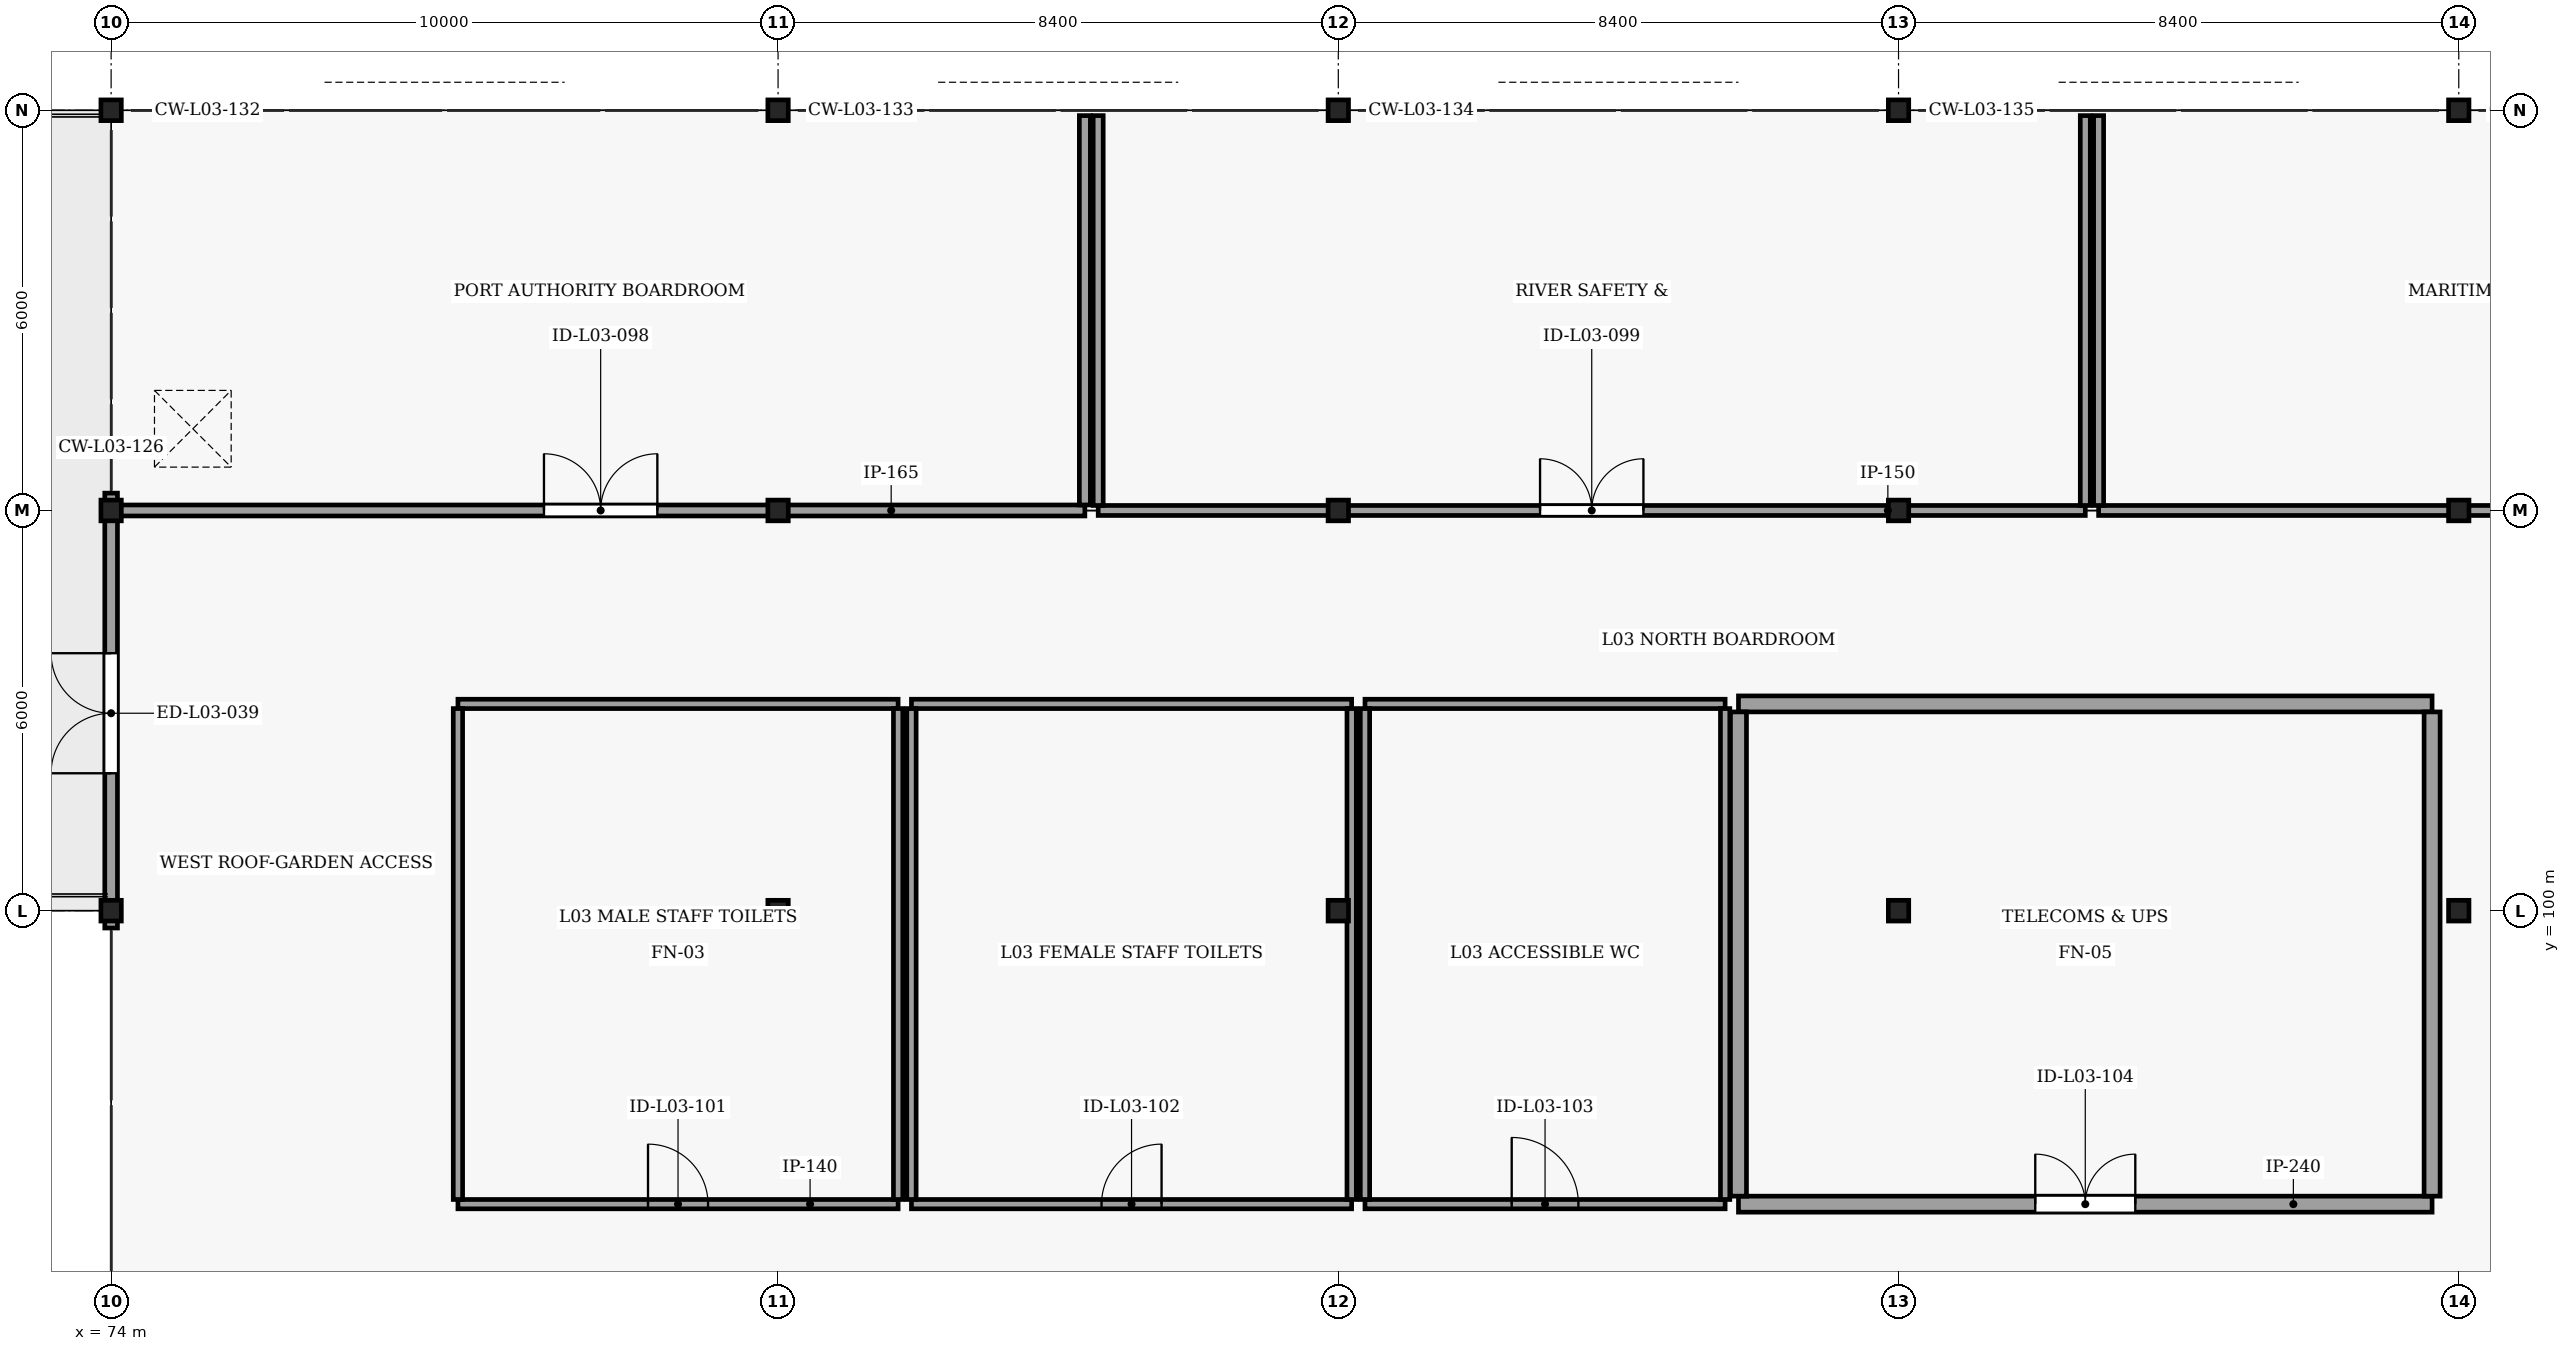
"""IFC4 building model, lengths in metres.
Left out: names, types, materials, properties, quantities, classifications, styles, units other than length and angle.
Written with IfcOpenShell. Run it as: python <this file> out.ifc"""

import sys

from ifc_helpers import new_model, si_unit, direction, frame, frame_2d, origin, origin_2d, place, context, subcontext, project, spatial, rectangle, i_section, extrude, element, fill, save


model = new_model("IFC4")
c1 = context("Model", 3, precision=1e-05, world=origin(), true_north=direction((0.0, 1.0)))
c2 = subcontext(c1, "Body", "Model", "MODEL_VIEW")
j1 = project(units=[si_unit("LENGTHUNIT", "METRE"), si_unit("PLANEANGLEUNIT", "RADIAN")], contexts=[c1])
p1 = place(None, origin())
s1 = spatial("IfcSite", under=j1, at=p1, CompositionType="ELEMENT")
p2 = place(p1, origin())
s2 = spatial("IfcBuilding", under=s1, at=p2, CompositionType="ELEMENT")
p3 = place(p2, frame((0.0, 0.0, 10.2)))
s3 = spatial("IfcBuildingStorey", under=s2, at=p3, CompositionType="ELEMENT", Elevation=10.2)
for number, where, z_axis, x_axis in (
    (1, (74.0, 100.0, 0.0), (0.0, 0.0, 1.0), (1.0, 0.0, 0.0)),
    (2, (84.0, 100.0, 0.0), (0.0, 0.0, 1.0), (1.0, 0.0, 0.0)),
    (3, (92.4, 100.0, 0.0), (0.0, 0.0, 1.0), (1.0, 0.0, 0.0)),
    (4, (100.8, 100.0, 0.0), (0.0, 0.0, 1.0), (1.0, 0.0, 0.0)),
    (5, (109.2, 100.0, 0.0), (0.0, 0.0, 1.0), (1.0, 0.0, 0.0)),
    (6, (74.0, 106.0, 0.0), (0.0, 0.0, 1.0), (1.0, 0.0, 0.0)),
    (7, (84.0, 106.0, 0.0), (0.0, 0.0, 1.0), (1.0, 0.0, 0.0)),
    (8, (92.4, 106.0, 0.0), (0.0, 0.0, 1.0), (1.0, 0.0, 0.0)),
    (9, (100.8, 106.0, 0.0), (0.0, 0.0, 1.0), (1.0, 0.0, 0.0)),
    (10, (109.2, 106.0, 0.0), (0.0, 0.0, 1.0), (1.0, 0.0, 0.0)),
):
    element("IfcColumn", number, at=place(p3, frame(where, z_axis=z_axis, x_axis=x_axis)), inside=s3, PredefinedType="COLUMN", context=c2, shape_type="SweptSolid", body=[
        extrude(i_section(OverallWidth=0.306, OverallDepth=0.311, WebThickness=0.011, FlangeThickness=0.017, FilletRadius=0.015, at=origin_2d()), origin(), (0.0, 0.0, 1.0), 3.92),
    ])
for number, where, z_axis, x_axis in (
    (11, (74.0, 112.0, 0.0), (0.0, 0.0, 1.0), (1.0, 0.0, 0.0)),
    (12, (84.0, 112.0, 0.0), (0.0, 0.0, 1.0), (1.0, 0.0, 0.0)),
    (13, (92.4, 112.0, 0.0), (0.0, 0.0, 1.0), (1.0, 0.0, 0.0)),
    (14, (100.8, 112.0, 0.0), (0.0, 0.0, 1.0), (1.0, 0.0, 0.0)),
    (15, (109.2, 112.0, 0.0), (0.0, 0.0, 1.0), (1.0, 0.0, 0.0)),
):
    element("IfcColumn", number, at=place(p3, frame(where, z_axis=z_axis, x_axis=x_axis)), inside=s3, PredefinedType="COLUMN", context=c2, shape_type="SweptSolid", body=[
        extrude(i_section(OverallWidth=0.306, OverallDepth=0.311, WebThickness=0.011, FlangeThickness=0.017, FilletRadius=0.015, at=origin_2d()), origin(), (0.0, 0.0, 1.0), 3.85),
    ])
p4 = place(p3, frame((74.0, 99.74, 0.0), z_axis=(0.0, 0.0, 1.0), x_axis=(0.0, 1.0, 0.0)))
e16 = element("IfcWall", 16, at=p4, inside=s3, PredefinedType="SOLIDWALL", context=c2, shape_type="SweptSolid", body=[
    extrude(rectangle(XDim=6.52, YDim=0.19, at=frame_2d((3.26, 0.0))), origin(), (0.0, 0.0, 1.0), 3.508),
])
p5 = place(p4, frame((2.32, 0.0, 0.0)))
e17 = element("IfcOpeningElement", 17, at=p5, cuts=e16, PredefinedType="OPENING", context=c2, shape_type="SweptSolid", body=[
    extrude(rectangle(XDim=1.8, YDim=2.25, at=frame_2d((0.9, 1.125))), frame((0.0, 0.105, 0.0), z_axis=(0.0, -1.0, 0.0), x_axis=(1.0, 0.0, 0.0)), (0.0, 0.0, 1.0), 0.21),
])
p6 = place(p3, frame((74.08, 106.0, 0.0), z_axis=(0.0, 0.0, 1.0), x_axis=(1.0, 0.0, 0.0)))
e18 = element("IfcWall", 18, at=p6, inside=s3, PredefinedType="PARTITIONING", context=c2, shape_type="SweptSolid", body=[
    extrude(rectangle(XDim=14.52, YDim=0.165, at=frame_2d((7.26, 0.0))), origin(), (0.0, 0.0, 1.0), 3.433),
])
p7 = place(p6, frame((6.41, 0.0, 0.0)))
e19 = element("IfcOpeningElement", 19, at=p7, cuts=e18, PredefinedType="OPENING", context=c2, shape_type="SweptSolid", body=[
    extrude(rectangle(XDim=1.7, YDim=2.25, at=frame_2d((0.85, 1.125))), frame((0.0, 0.093, 0.0), z_axis=(0.0, -1.0, 0.0), x_axis=(1.0, 0.0, 0.0)), (0.0, 0.0, 1.0), 0.185),
])
p8 = place(p3, frame((88.6, 106.083, 0.0), z_axis=(0.0, 0.0, 1.0), x_axis=(0.0, 1.0, 0.0)))
e20 = element("IfcWall", 20, at=p8, inside=s3, PredefinedType="PARTITIONING", context=c2, shape_type="SweptSolid", body=[
    extrude(rectangle(XDim=5.837, YDim=0.165, at=frame_2d((2.919, 0.0))), origin(), (0.0, 0.0, 1.0), 3.588),
])
p9 = place(p3, frame((88.8, 106.0, 0.0), z_axis=(0.0, 0.0, 1.0), x_axis=(1.0, 0.0, 0.0)))
e21 = element("IfcWall", 21, at=p9, inside=s3, PredefinedType="PARTITIONING", context=c2, shape_type="SweptSolid", body=[
    extrude(rectangle(XDim=14.8, YDim=0.15, at=frame_2d((7.4, 0.0))), origin(), (0.0, 0.0, 1.0), 3.433),
])
p10 = place(p9, frame((6.625, 0.0, 0.0)))
e22 = element("IfcOpeningElement", 22, at=p10, cuts=e21, PredefinedType="OPENING", context=c2, shape_type="SweptSolid", body=[
    extrude(rectangle(XDim=1.55, YDim=2.2, at=frame_2d((0.775, 1.1))), frame((0.0, 0.085, 0.0), z_axis=(0.0, -1.0, 0.0), x_axis=(1.0, 0.0, 0.0)), (0.0, 0.0, 1.0), 0.17),
])
for number, where, z_axis, x_axis in (
    (23, (88.8, 106.075, 0.0), (0.0, 0.0, 1.0), (0.0, 1.0, 0.0)),
    (24, (103.6, 106.075, 0.0), (0.0, 0.0, 1.0), (0.0, 1.0, 0.0)),
):
    element("IfcWall", number, at=place(p3, frame(where, z_axis=z_axis, x_axis=x_axis)), inside=s3, PredefinedType="PARTITIONING", context=c2, shape_type="SweptSolid", body=[
        extrude(rectangle(XDim=5.845, YDim=0.15, at=frame_2d((2.922, 0.0))), origin(), (0.0, 0.0, 1.0), 3.588),
    ])
p11 = place(p3, frame((103.8, 106.0, 0.0), z_axis=(0.0, 0.0, 1.0), x_axis=(1.0, 0.0, 0.0)))
e25 = element("IfcWall", 25, at=p11, inside=s3, PredefinedType="PARTITIONING", context=c2, shape_type="SweptSolid", body=[
    extrude(rectangle(XDim=13.72, YDim=0.15, at=frame_2d((6.86, 0.0))), origin(), (0.0, 0.0, 1.0), 3.433),
])
p12 = place(p11, frame((5.96, 0.0, 0.0)))
e26 = element("IfcOpeningElement", 26, at=p12, cuts=e25, PredefinedType="OPENING", context=c2, shape_type="SweptSolid", body=[
    extrude(rectangle(XDim=1.8, YDim=2.3, at=frame_2d((0.9, 1.15))), frame((0.0, 0.085, 0.0), z_axis=(0.0, -1.0, 0.0), x_axis=(1.0, 0.0, 0.0)), (0.0, 0.0, 1.0), 0.17),
])
p13 = place(p3, frame((103.8, 106.075, 0.0), z_axis=(0.0, 0.0, 1.0), x_axis=(0.0, 1.0, 0.0)))
e27 = element("IfcWall", 27, at=p13, inside=s3, PredefinedType="PARTITIONING", context=c2, shape_type="SweptSolid", body=[
    extrude(rectangle(XDim=5.845, YDim=0.15, at=frame_2d((2.922, 0.0))), origin(), (0.0, 0.0, 1.0), 3.588),
])
p14 = place(p3, frame((79.2, 95.6, 0.0), z_axis=(0.0, 0.0, 1.0), x_axis=(1.0, 0.0, 0.0)))
e28 = element("IfcWall", 28, at=p14, inside=s3, PredefinedType="PARTITIONING", context=c2, shape_type="SweptSolid", body=[
    extrude(rectangle(XDim=6.6, YDim=0.14, at=frame_2d((3.3, 0.0))), origin(), (0.0, 0.0, 1.0), 3.51),
])
p15 = place(p14, frame((2.85, 0.0, 0.0)))
e29 = element("IfcOpeningElement", 29, at=p15, cuts=e28, PredefinedType="OPENING", context=c2, shape_type="SweptSolid", body=[
    extrude(rectangle(XDim=0.9, YDim=2.1, at=frame_2d((0.45, 1.05))), frame((0.0, 0.08, 0.0), z_axis=(0.0, -1.0, 0.0), x_axis=(1.0, 0.0, 0.0)), (0.0, 0.0, 1.0), 0.16),
])
p16 = place(p3, frame((79.2, 103.1, 0.0), z_axis=(0.0, 0.0, 1.0), x_axis=(1.0, 0.0, 0.0)))
e30 = element("IfcWall", 30, at=p16, inside=s3, PredefinedType="PARTITIONING", context=c2, shape_type="SweptSolid", body=[
    extrude(rectangle(XDim=6.6, YDim=0.14, at=frame_2d((3.3, 0.0))), origin(), (0.0, 0.0, 1.0), 3.51),
])
for number, where, z_axis, x_axis in (
    (31, (79.2, 95.67, 0.0), (0.0, 0.0, 1.0), (0.0, 1.0, 0.0)),
    (32, (85.8, 95.67, 0.0), (0.0, 0.0, 1.0), (0.0, 1.0, 0.0)),
):
    element("IfcWall", number, at=place(p3, frame(where, z_axis=z_axis, x_axis=x_axis)), inside=s3, PredefinedType="PARTITIONING", context=c2, shape_type="SweptSolid", body=[
        extrude(rectangle(XDim=7.36, YDim=0.14, at=frame_2d((3.68, 0.0))), origin(), (0.0, 0.0, 1.0), 3.503),
    ])
p17 = place(p3, frame((86.0, 95.6, 0.0), z_axis=(0.0, 0.0, 1.0), x_axis=(1.0, 0.0, 0.0)))
e33 = element("IfcWall", 33, at=p17, inside=s3, PredefinedType="PARTITIONING", context=c2, shape_type="SweptSolid", body=[
    extrude(rectangle(XDim=6.6, YDim=0.14, at=frame_2d((3.3, 0.0))), origin(), (0.0, 0.0, 1.0), 3.51),
])
p18 = place(p17, frame((2.85, 0.0, 0.0)))
e34 = element("IfcOpeningElement", 34, at=p18, cuts=e33, PredefinedType="OPENING", context=c2, shape_type="SweptSolid", body=[
    extrude(rectangle(XDim=0.9, YDim=2.1, at=frame_2d((0.45, 1.05))), frame((0.0, 0.08, 0.0), z_axis=(0.0, -1.0, 0.0), x_axis=(1.0, 0.0, 0.0)), (0.0, 0.0, 1.0), 0.16),
])
p19 = place(p3, frame((86.0, 103.1, 0.0), z_axis=(0.0, 0.0, 1.0), x_axis=(1.0, 0.0, 0.0)))
e35 = element("IfcWall", 35, at=p19, inside=s3, PredefinedType="PARTITIONING", context=c2, shape_type="SweptSolid", body=[
    extrude(rectangle(XDim=6.6, YDim=0.14, at=frame_2d((3.3, 0.0))), origin(), (0.0, 0.0, 1.0), 3.51),
])
for number, where, z_axis, x_axis in (
    (36, (86.0, 95.67, 0.0), (0.0, 0.0, 1.0), (0.0, 1.0, 0.0)),
    (37, (92.6, 95.67, 0.0), (0.0, 0.0, 1.0), (0.0, 1.0, 0.0)),
):
    element("IfcWall", number, at=place(p3, frame(where, z_axis=z_axis, x_axis=x_axis)), inside=s3, PredefinedType="PARTITIONING", context=c2, shape_type="SweptSolid", body=[
        extrude(rectangle(XDim=7.36, YDim=0.14, at=frame_2d((3.68, 0.0))), origin(), (0.0, 0.0, 1.0), 3.503),
    ])
p20 = place(p3, frame((92.8, 95.6, 0.0), z_axis=(0.0, 0.0, 1.0), x_axis=(1.0, 0.0, 0.0)))
e38 = element("IfcWall", 38, at=p20, inside=s3, PredefinedType="PARTITIONING", context=c2, shape_type="SweptSolid", body=[
    extrude(rectangle(XDim=5.4, YDim=0.14, at=frame_2d((2.7, 0.0))), origin(), (0.0, 0.0, 1.0), 3.9),
])
p21 = place(p20, frame((2.2, 0.0, 0.0)))
e39 = element("IfcOpeningElement", 39, at=p21, cuts=e38, PredefinedType="OPENING", context=c2, shape_type="SweptSolid", body=[
    extrude(rectangle(XDim=1.0, YDim=2.15, at=frame_2d((0.5, 1.075))), frame((0.0, 0.08, 0.0), z_axis=(0.0, -1.0, 0.0), x_axis=(1.0, 0.0, 0.0)), (0.0, 0.0, 1.0), 0.16),
])
p22 = place(p3, frame((92.8, 103.1, 0.0), z_axis=(0.0, 0.0, 1.0), x_axis=(1.0, 0.0, 0.0)))
e40 = element("IfcWall", 40, at=p22, inside=s3, PredefinedType="PARTITIONING", context=c2, shape_type="SweptSolid", body=[
    extrude(rectangle(XDim=5.4, YDim=0.14, at=frame_2d((2.7, 0.0))), origin(), (0.0, 0.0, 1.0), 3.9),
])
for number, where, z_axis, x_axis in (
    (41, (92.8, 95.67, 0.0), (0.0, 0.0, 1.0), (0.0, 1.0, 0.0)),
    (42, (98.2, 95.67, 0.0), (0.0, 0.0, 1.0), (0.0, 1.0, 0.0)),
):
    element("IfcWall", number, at=place(p3, frame(where, z_axis=z_axis, x_axis=x_axis)), inside=s3, PredefinedType="PARTITIONING", context=c2, shape_type="SweptSolid", body=[
        extrude(rectangle(XDim=7.36, YDim=0.14, at=frame_2d((3.68, 0.0))), origin(), (0.0, 0.0, 1.0), 3.503),
    ])
p23 = place(p3, frame((98.4, 95.6, 0.0), z_axis=(0.0, 0.0, 1.0), x_axis=(1.0, 0.0, 0.0)))
e43 = element("IfcWall", 43, at=p23, inside=s3, PredefinedType="SOLIDWALL", context=c2, shape_type="SweptSolid", body=[
    extrude(rectangle(XDim=10.4, YDim=0.24, at=frame_2d((5.2, 0.0))), origin(), (0.0, 0.0, 1.0), 3.51),
])
p24 = place(p23, frame((4.45, 0.0, 0.0)))
e44 = element("IfcOpeningElement", 44, at=p24, cuts=e43, PredefinedType="OPENING", context=c2, shape_type="SweptSolid", body=[
    extrude(rectangle(XDim=1.5, YDim=2.25, at=frame_2d((0.75, 1.125))), frame((0.0, 0.13, 0.0), z_axis=(0.0, -1.0, 0.0), x_axis=(1.0, 0.0, 0.0)), (0.0, 0.0, 1.0), 0.26),
])
p25 = place(p3, frame((98.4, 103.1, 0.0), z_axis=(0.0, 0.0, 1.0), x_axis=(1.0, 0.0, 0.0)))
e45 = element("IfcWall", 45, at=p25, inside=s3, PredefinedType="SOLIDWALL", context=c2, shape_type="SweptSolid", body=[
    extrude(rectangle(XDim=10.4, YDim=0.24, at=frame_2d((5.2, 0.0))), origin(), (0.0, 0.0, 1.0), 3.51),
])
for number, where, z_axis, x_axis in (
    (46, (98.4, 95.72, 0.0), (0.0, 0.0, 1.0), (0.0, 1.0, 0.0)),
    (47, (108.8, 95.72, 0.0), (0.0, 0.0, 1.0), (0.0, 1.0, 0.0)),
):
    element("IfcWall", number, at=place(p3, frame(where, z_axis=z_axis, x_axis=x_axis)), inside=s3, PredefinedType="SOLIDWALL", context=c2, shape_type="SweptSolid", body=[
        extrude(rectangle(XDim=7.26, YDim=0.24, at=frame_2d((3.63, 0.0))), origin(), (0.0, 0.0, 1.0), 3.503),
    ])
p26 = place(p5, origin())
e48 = element("IfcDoor", 48, at=p26, inside=s3, OperationType="DOUBLE_DOOR_SINGLE_SWING", PredefinedType="DOOR", context=c2, shape_type="SweptSolid", body=[
    extrude(rectangle(XDim=1.8, YDim=2.25, at=frame_2d((0.9, 1.125))), frame((0.0, 0.025, 0.0), z_axis=(0.0, -1.0, 0.0), x_axis=(1.0, 0.0, 0.0)), (0.0, 0.0, 1.0), 0.05),
])
fill(e17, e48)
p27 = place(p7, origin())
e49 = element("IfcDoor", 49, at=p27, inside=s3, OperationType="DOUBLE_DOOR_SINGLE_SWING", PredefinedType="DOOR", context=c2, shape_type="SweptSolid", body=[
    extrude(rectangle(XDim=1.7, YDim=2.25, at=frame_2d((0.85, 1.125))), frame((0.0, 0.025, 0.0), z_axis=(0.0, -1.0, 0.0), x_axis=(1.0, 0.0, 0.0)), (0.0, 0.0, 1.0), 0.05),
])
fill(e19, e49)
p28 = place(p10, origin())
e50 = element("IfcDoor", 50, at=p28, inside=s3, OperationType="DOUBLE_DOOR_SINGLE_SWING", PredefinedType="DOOR", context=c2, shape_type="SweptSolid", body=[
    extrude(rectangle(XDim=1.55, YDim=2.2, at=frame_2d((0.775, 1.1))), frame((0.0, 0.025, 0.0), z_axis=(0.0, -1.0, 0.0), x_axis=(1.0, 0.0, 0.0)), (0.0, 0.0, 1.0), 0.05),
])
fill(e22, e50)
p29 = place(p15, origin())
e51 = element("IfcDoor", 51, at=p29, inside=s3, OperationType="SINGLE_SWING_LEFT", PredefinedType="DOOR", context=c2, shape_type="SweptSolid", body=[
    extrude(rectangle(XDim=0.9, YDim=2.1, at=frame_2d((0.45, 1.05))), frame((0.0, 0.025, 0.0), z_axis=(0.0, -1.0, 0.0), x_axis=(1.0, 0.0, 0.0)), (0.0, 0.0, 1.0), 0.05),
])
fill(e29, e51)
p30 = place(p18, origin())
e52 = element("IfcDoor", 52, at=p30, inside=s3, OperationType="SINGLE_SWING_RIGHT", PredefinedType="DOOR", context=c2, shape_type="SweptSolid", body=[
    extrude(rectangle(XDim=0.9, YDim=2.1, at=frame_2d((0.45, 1.05))), frame((0.0, 0.025, 0.0), z_axis=(0.0, -1.0, 0.0), x_axis=(1.0, 0.0, 0.0)), (0.0, 0.0, 1.0), 0.05),
])
fill(e34, e52)
p31 = place(p21, origin())
e53 = element("IfcDoor", 53, at=p31, inside=s3, OperationType="SINGLE_SWING_LEFT", PredefinedType="DOOR", context=c2, shape_type="SweptSolid", body=[
    extrude(rectangle(XDim=1.0, YDim=2.15, at=frame_2d((0.5, 1.075))), frame((0.0, 0.025, 0.0), z_axis=(0.0, -1.0, 0.0), x_axis=(1.0, 0.0, 0.0)), (0.0, 0.0, 1.0), 0.05),
])
fill(e39, e53)
p32 = place(p24, origin())
e54 = element("IfcDoor", 54, at=p32, inside=s3, OperationType="DOUBLE_DOOR_SINGLE_SWING", PredefinedType="DOOR", context=c2, shape_type="SweptSolid", body=[
    extrude(rectangle(XDim=1.5, YDim=2.25, at=frame_2d((0.75, 1.125))), frame((0.0, 0.025, 0.0), z_axis=(0.0, -1.0, 0.0), x_axis=(1.0, 0.0, 0.0)), (0.0, 0.0, 1.0), 0.05),
])
fill(e44, e54)
save(model, sys.argv[1])
